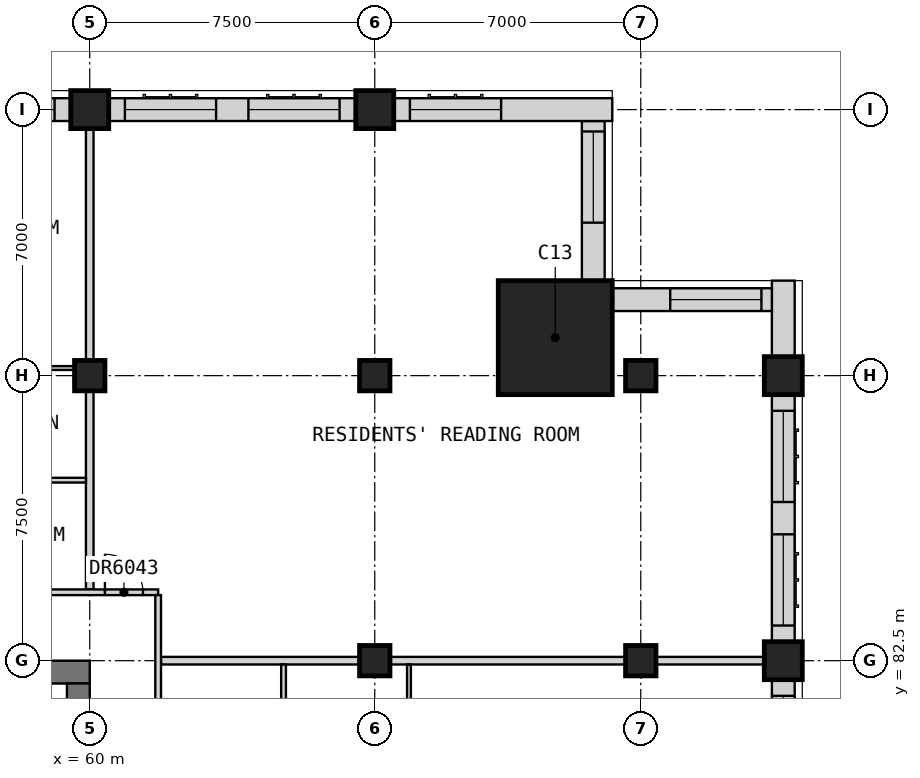
"""IFC4 building model, lengths in metres.
Left out: names, types, materials, properties, quantities, classifications, styles, units other than length and angle.
Written with IfcOpenShell. Run it as: python <this file> out.ifc"""

import sys

from ifc_helpers import new_model, si_unit, direction, frame, frame_2d, origin, origin_2d, place, context, subcontext, project, spatial, rectangle, extrude, element, fill, save


model = new_model("IFC4")
c1 = context("Model", 3, precision=1e-05, world=origin(), true_north=direction((0.0, 1.0)))
c2 = subcontext(c1, "Body", "Model", "MODEL_VIEW")
j1 = project(units=[si_unit("LENGTHUNIT", "METRE"), si_unit("PLANEANGLEUNIT", "RADIAN")], contexts=[c1])
p1 = place(None, origin())
s1 = spatial("IfcSite", under=j1, at=p1, CompositionType="ELEMENT")
p2 = place(p1, origin())
s2 = spatial("IfcBuilding", under=s1, at=p2, CompositionType="ELEMENT")
p3 = place(p2, frame((0.0, 0.0, 226.7)))
s3 = spatial("IfcBuildingStorey", under=s2, at=p3, CompositionType="ELEMENT", Elevation=226.7)
for number, where, z_axis, x_axis in (
    (1, (78.25, 82.5, 0.0), (0.0, 0.0, 1.0), (1.0, 0.0, 0.0)),
    (2, (78.25, 90.0, 0.0), (0.0, 0.0, 1.0), (1.0, 0.0, 0.0)),
):
    element("IfcColumn", number, at=place(p3, frame(where, z_axis=z_axis, x_axis=x_axis)), inside=s3, PredefinedType="COLUMN", context=c2, shape_type="SweptSolid", body=[
        extrude(rectangle(XDim=1.0, YDim=1.0, at=origin_2d()), origin(), (0.0, 0.0, 1.0), 3.5),
    ])
p4 = place(p3, frame((60.0, 90.0, 0.0), z_axis=(0.0, 0.0, 1.0), x_axis=(1.0, 0.0, 0.0)))
e3 = element("IfcColumn", 3, at=p4, inside=s3, PredefinedType="COLUMN", context=c2, shape_type="SweptSolid", body=[
    extrude(rectangle(XDim=0.8, YDim=0.8, at=origin_2d()), origin(), (0.0, 0.0, 1.0), 3.5),
])
p5 = place(p3, frame((60.0, 97.0, 0.0), z_axis=(0.0, 0.0, 1.0), x_axis=(1.0, 0.0, 0.0)))
e4 = element("IfcColumn", 4, at=p5, inside=s3, PredefinedType="COLUMN", context=c2, shape_type="SweptSolid", body=[
    extrude(rectangle(XDim=1.0, YDim=1.0, at=origin_2d()), origin(), (0.0, 0.0, 1.0), 3.5),
])
for number, where, z_axis, x_axis in (
    (5, (67.5, 82.5, 0.0), (0.0, 0.0, 1.0), (1.0, 0.0, 0.0)),
    (6, (67.5, 90.0, 0.0), (0.0, 0.0, 1.0), (1.0, 0.0, 0.0)),
):
    element("IfcColumn", number, at=place(p3, frame(where, z_axis=z_axis, x_axis=x_axis)), inside=s3, PredefinedType="COLUMN", context=c2, shape_type="SweptSolid", body=[
        extrude(rectangle(XDim=0.8, YDim=0.8, at=origin_2d()), origin(), (0.0, 0.0, 1.0), 3.5),
    ])
p6 = place(p3, frame((67.5, 97.0, 0.0), z_axis=(0.0, 0.0, 1.0), x_axis=(1.0, 0.0, 0.0)))
e7 = element("IfcColumn", 7, at=p6, inside=s3, PredefinedType="COLUMN", context=c2, shape_type="SweptSolid", body=[
    extrude(rectangle(XDim=1.0, YDim=1.0, at=origin_2d()), origin(), (0.0, 0.0, 1.0), 3.5),
])
for number, where, z_axis, x_axis in (
    (8, (74.5, 82.5, 0.0), (0.0, 0.0, 1.0), (1.0, 0.0, 0.0)),
    (9, (74.5, 90.0, 0.0), (0.0, 0.0, 1.0), (1.0, 0.0, 0.0)),
):
    element("IfcColumn", number, at=place(p3, frame(where, z_axis=z_axis, x_axis=x_axis)), inside=s3, PredefinedType="COLUMN", context=c2, shape_type="SweptSolid", body=[
        extrude(rectangle(XDim=0.8, YDim=0.8, at=origin_2d()), origin(), (0.0, 0.0, 1.0), 3.5),
    ])
p7 = place(p3, frame((72.25, 91.0, 0.0), z_axis=(0.0, 0.0, 1.0), x_axis=(1.0, 0.0, 0.0)))
e10 = element("IfcColumn", 10, at=p7, inside=s3, PredefinedType="COLUMN", context=c2, shape_type="SweptSolid", body=[
    extrude(rectangle(XDim=3.0, YDim=3.0, at=origin_2d()), origin(), (0.0, 0.0, 1.0), 3.5),
])
p8 = place(p3, frame((30.0, 82.2, 0.0), z_axis=(0.0, 0.0, 1.0), x_axis=(1.0, 0.0, 0.0)))
e11 = element("IfcWall", 11, at=p8, inside=s3, PredefinedType="SHEAR", context=c2, shape_type="SweptSolid", body=[
    extrude(rectangle(XDim=30.0, YDim=0.6, at=frame_2d((15.0, 0.0))), origin(), (0.0, 0.0, 1.0), 3.5),
])
p9 = place(p3, frame((59.7, 60.6, 0.0), z_axis=(0.0, 0.0, 1.0), x_axis=(0.0, 1.0, 0.0)))
e12 = element("IfcWall", 12, at=p9, inside=s3, PredefinedType="SHEAR", context=c2, shape_type="SweptSolid", body=[
    extrude(rectangle(XDim=21.3, YDim=0.6, at=frame_2d((10.65, 0.0))), origin(), (0.0, 0.0, 1.0), 3.5),
])
p10 = place(p9, frame((14.9, 0.0, 0.0)))
e13 = element("IfcOpeningElement", 13, at=p10, cuts=e12, PredefinedType="OPENING", context=c2, shape_type="SweptSolid", body=[
    extrude(rectangle(XDim=1.8, YDim=2.1, at=frame_2d((0.9, 1.05))), frame((0.0, 0.31, 0.0), z_axis=(0.0, -1.0, 0.0), x_axis=(1.0, 0.0, 0.0)), (0.0, 0.0, 1.0), 0.62),
])
p11 = place(p3, frame((78.25, 75.5, 0.0), z_axis=(0.0, 0.0, 1.0), x_axis=(0.0, 1.0, 0.0)))
e14 = element("IfcWall", 14, at=p11, inside=s3, PredefinedType="SOLIDWALL", context=c2, shape_type="SweptSolid", body=[
    extrude(rectangle(XDim=6.5, YDim=0.6, at=frame_2d((3.25, 0.0))), origin(), (0.0, 0.0, 1.0), 2.75),
])
p12 = place(p11, frame((0.425, 0.0, 0.8)))
e15 = element("IfcOpeningElement", 15, at=p12, cuts=e14, PredefinedType="OPENING", context=c2, shape_type="SweptSolid", body=[
    extrude(rectangle(XDim=2.4, YDim=1.8, at=frame_2d((1.2, 0.9))), frame((0.0, 0.31, 0.0), z_axis=(0.0, -1.0, 0.0), x_axis=(1.0, 0.0, 0.0)), (0.0, 0.0, 1.0), 0.62),
])
p13 = place(p11, frame((3.675, 0.0, 0.8)))
e16 = element("IfcOpeningElement", 16, at=p13, cuts=e14, PredefinedType="OPENING", context=c2, shape_type="SweptSolid", body=[
    extrude(rectangle(XDim=2.4, YDim=1.8, at=frame_2d((1.2, 0.9))), frame((0.0, 0.31, 0.0), z_axis=(0.0, -1.0, 0.0), x_axis=(1.0, 0.0, 0.0)), (0.0, 0.0, 1.0), 0.62),
])
p14 = place(p3, frame((78.25, 83.0, 0.0), z_axis=(0.0, 0.0, 1.0), x_axis=(0.0, 1.0, 0.0)))
e17 = element("IfcWall", 17, at=p14, inside=s3, PredefinedType="SOLIDWALL", context=c2, shape_type="SweptSolid", body=[
    extrude(rectangle(XDim=6.5, YDim=0.6, at=frame_2d((3.25, 0.0))), origin(), (0.0, 0.0, 1.0), 2.75),
])
p15 = place(p14, frame((0.425, 0.0, 0.8)))
e18 = element("IfcOpeningElement", 18, at=p15, cuts=e17, PredefinedType="OPENING", context=c2, shape_type="SweptSolid", body=[
    extrude(rectangle(XDim=2.4, YDim=1.8, at=frame_2d((1.2, 0.9))), frame((0.0, 0.31, 0.0), z_axis=(0.0, -1.0, 0.0), x_axis=(1.0, 0.0, 0.0)), (0.0, 0.0, 1.0), 0.62),
])
p16 = place(p14, frame((3.675, 0.0, 0.8)))
e19 = element("IfcOpeningElement", 19, at=p16, cuts=e17, PredefinedType="OPENING", context=c2, shape_type="SweptSolid", body=[
    extrude(rectangle(XDim=2.4, YDim=1.8, at=frame_2d((1.2, 0.9))), frame((0.0, 0.31, 0.0), z_axis=(0.0, -1.0, 0.0), x_axis=(1.0, 0.0, 0.0)), (0.0, 0.0, 1.0), 0.62),
])
p17 = place(p3, frame((78.25, 90.5, 0.0), z_axis=(0.0, 0.0, 1.0), x_axis=(0.0, 1.0, 0.0)))
e20 = element("IfcWall", 20, at=p17, inside=s3, PredefinedType="SOLIDWALL", context=c2, shape_type="SweptSolid", body=[
    extrude(rectangle(XDim=2.0, YDim=0.6, at=frame_2d((1.0, 0.0))), origin(), (0.0, 0.0, 1.0), 3.25),
])
p18 = place(p3, frame((77.95, 92.0, 0.0), z_axis=(0.0, 0.0, 1.0), x_axis=(-1.0, 0.0, 0.0)))
e21 = element("IfcWall", 21, at=p18, inside=s3, PredefinedType="SOLIDWALL", context=c2, shape_type="SweptSolid", body=[
    extrude(rectangle(XDim=4.2, YDim=0.6, at=frame_2d((2.1, 0.0))), origin(), (0.0, 0.0, 1.0), 3.25),
])
p19 = place(p18, frame((0.275, 0.0, 0.8)))
e22 = element("IfcOpeningElement", 22, at=p19, cuts=e21, PredefinedType="OPENING", context=c2, shape_type="SweptSolid", body=[
    extrude(rectangle(XDim=2.4, YDim=1.8, at=frame_2d((1.2, 0.9))), frame((0.0, 0.31, 0.0), z_axis=(0.0, -1.0, 0.0), x_axis=(1.0, 0.0, 0.0)), (0.0, 0.0, 1.0), 0.62),
])
p20 = place(p3, frame((73.25, 92.5, 0.0), z_axis=(0.0, 0.0, 1.0), x_axis=(0.0, 1.0, 0.0)))
e23 = element("IfcWall", 23, at=p20, inside=s3, PredefinedType="SOLIDWALL", context=c2, shape_type="SweptSolid", body=[
    extrude(rectangle(XDim=4.2, YDim=0.6, at=frame_2d((2.1, 0.0))), origin(), (0.0, 0.0, 1.0), 3.25),
])
p21 = place(p20, frame((1.525, 0.0, 0.8)))
e24 = element("IfcOpeningElement", 24, at=p21, cuts=e23, PredefinedType="OPENING", context=c2, shape_type="SweptSolid", body=[
    extrude(rectangle(XDim=2.4, YDim=1.8, at=frame_2d((1.2, 0.9))), frame((0.0, 0.31, 0.0), z_axis=(0.0, -1.0, 0.0), x_axis=(1.0, 0.0, 0.0)), (0.0, 0.0, 1.0), 0.62),
])
p22 = place(p3, frame((73.75, 97.0, 0.0), z_axis=(0.0, 0.0, 1.0), x_axis=(-1.0, 0.0, 0.0)))
e25 = element("IfcWall", 25, at=p22, inside=s3, PredefinedType="SOLIDWALL", context=c2, shape_type="SweptSolid", body=[
    extrude(rectangle(XDim=5.75, YDim=0.6, at=frame_2d((2.875, 0.0))), origin(), (0.0, 0.0, 1.0), 2.75),
])
p23 = place(p22, frame((2.925, 0.0, 0.8)))
e26 = element("IfcOpeningElement", 26, at=p23, cuts=e25, PredefinedType="OPENING", context=c2, shape_type="SweptSolid", body=[
    extrude(rectangle(XDim=2.4, YDim=1.8, at=frame_2d((1.2, 0.9))), frame((0.0, 0.31, 0.0), z_axis=(0.0, -1.0, 0.0), x_axis=(1.0, 0.0, 0.0)), (0.0, 0.0, 1.0), 0.62),
])
p24 = place(p3, frame((67.0, 97.0, 0.0), z_axis=(0.0, 0.0, 1.0), x_axis=(-1.0, 0.0, 0.0)))
e27 = element("IfcWall", 27, at=p24, inside=s3, PredefinedType="SOLIDWALL", context=c2, shape_type="SweptSolid", body=[
    extrude(rectangle(XDim=6.5, YDim=0.6, at=frame_2d((3.25, 0.0))), origin(), (0.0, 0.0, 1.0), 2.75),
])
p25 = place(p24, frame((3.675, 0.0, 0.8)))
e28 = element("IfcOpeningElement", 28, at=p25, cuts=e27, PredefinedType="OPENING", context=c2, shape_type="SweptSolid", body=[
    extrude(rectangle(XDim=2.4, YDim=1.8, at=frame_2d((1.2, 0.9))), frame((0.0, 0.31, 0.0), z_axis=(0.0, -1.0, 0.0), x_axis=(1.0, 0.0, 0.0)), (0.0, 0.0, 1.0), 0.62),
])
p26 = place(p24, frame((0.425, 0.0, 0.8)))
e29 = element("IfcOpeningElement", 29, at=p26, cuts=e27, PredefinedType="OPENING", context=c2, shape_type="SweptSolid", body=[
    extrude(rectangle(XDim=2.4, YDim=1.8, at=frame_2d((1.2, 0.9))), frame((0.0, 0.31, 0.0), z_axis=(0.0, -1.0, 0.0), x_axis=(1.0, 0.0, 0.0)), (0.0, 0.0, 1.0), 0.62),
])
p27 = place(p3, frame((59.5, 97.0, 0.0), z_axis=(0.0, 0.0, 1.0), x_axis=(-1.0, 0.0, 0.0)))
e30 = element("IfcWall", 30, at=p27, inside=s3, PredefinedType="SOLIDWALL", context=c2, shape_type="SweptSolid", body=[
    extrude(rectangle(XDim=6.5, YDim=0.6, at=frame_2d((3.25, 0.0))), origin(), (0.0, 0.0, 1.0), 2.75),
])
p28 = place(p27, frame((3.675, 0.0, 0.8)))
e31 = element("IfcOpeningElement", 31, at=p28, cuts=e30, PredefinedType="OPENING", context=c2, shape_type="SweptSolid", body=[
    extrude(rectangle(XDim=2.4, YDim=1.8, at=frame_2d((1.2, 0.9))), frame((0.0, 0.31, 0.0), z_axis=(0.0, -1.0, 0.0), x_axis=(1.0, 0.0, 0.0)), (0.0, 0.0, 1.0), 0.62),
])
p29 = place(p27, frame((0.425, 0.0, 0.8)))
e32 = element("IfcOpeningElement", 32, at=p29, cuts=e30, PredefinedType="OPENING", context=c2, shape_type="SweptSolid", body=[
    extrude(rectangle(XDim=2.4, YDim=1.8, at=frame_2d((1.2, 0.9))), frame((0.0, 0.31, 0.0), z_axis=(0.0, -1.0, 0.0), x_axis=(1.0, 0.0, 0.0)), (0.0, 0.0, 1.0), 0.62),
])
p30 = place(p3, frame((61.875, 82.5, 0.0), z_axis=(0.0, 0.0, 1.0), x_axis=(1.0, 0.0, 0.0)))
e33 = element("IfcWall", 33, at=p30, inside=s3, PredefinedType="PARTITIONING", context=c2, shape_type="SweptSolid", body=[
    extrude(rectangle(XDim=16.875, YDim=0.2, at=frame_2d((8.438, 0.0))), origin(), (0.0, 0.0, 1.0), 3.25),
])
p31 = place(p3, frame((60.0, 84.375, 0.0), z_axis=(0.0, 0.0, 1.0), x_axis=(0.0, 1.0, 0.0)))
e34 = element("IfcWall", 34, at=p31, inside=s3, PredefinedType="PARTITIONING", context=c2, shape_type="SweptSolid", body=[
    extrude(rectangle(XDim=13.125, YDim=0.2, at=frame_2d((6.562, 0.0))), origin(), (0.0, 0.0, 1.0), 3.25),
])
p32 = place(p3, frame((33.75, 84.3, 0.0), z_axis=(0.0, 0.0, 1.0), x_axis=(1.0, 0.0, 0.0)))
e35 = element("IfcWall", 35, at=p32, inside=s3, PredefinedType="PARTITIONING", context=c2, shape_type="SweptSolid", body=[
    extrude(rectangle(XDim=28.05, YDim=0.15, at=frame_2d((14.025, 0.0))), origin(), (0.0, 0.0, 1.0), 3.25),
])
p33 = place(p32, frame((12.675, 0.0, 0.0)))
e36 = element("IfcOpeningElement", 36, at=p33, cuts=e35, PredefinedType="OPENING", context=c2, shape_type="SweptSolid", body=[
    extrude(rectangle(XDim=0.9, YDim=2.1, at=frame_2d((0.45, 1.05))), frame((0.0, 0.085, 0.0), z_axis=(0.0, -1.0, 0.0), x_axis=(1.0, 0.0, 0.0)), (0.0, 0.0, 1.0), 0.17),
])
p34 = place(p32, frame((20.175, 0.0, 0.0)))
e37 = element("IfcOpeningElement", 37, at=p34, cuts=e35, PredefinedType="OPENING", context=c2, shape_type="SweptSolid", body=[
    extrude(rectangle(XDim=0.9, YDim=2.1, at=frame_2d((0.45, 1.05))), frame((0.0, 0.085, 0.0), z_axis=(0.0, -1.0, 0.0), x_axis=(1.0, 0.0, 0.0)), (0.0, 0.0, 1.0), 0.17),
])
p35 = place(p32, frame((26.65, 0.0, 0.0)))
e38 = element("IfcOpeningElement", 38, at=p35, cuts=e35, PredefinedType="OPENING", context=c2, shape_type="SweptSolid", body=[
    extrude(rectangle(XDim=1.0, YDim=2.1, at=frame_2d((0.5, 1.05))), frame((0.0, 0.085, 0.0), z_axis=(0.0, -1.0, 0.0), x_axis=(1.0, 0.0, 0.0)), (0.0, 0.0, 1.0), 0.17),
])
p36 = place(p3, frame((61.8, 58.275, 0.0), z_axis=(0.0, 0.0, 1.0), x_axis=(0.0, 1.0, 0.0)))
e39 = element("IfcWall", 39, at=p36, inside=s3, PredefinedType="PARTITIONING", context=c2, shape_type="SweptSolid", body=[
    extrude(rectangle(XDim=25.95, YDim=0.15, at=frame_2d((12.975, 0.0))), origin(), (0.0, 0.0, 1.0), 3.25),
])
p37 = place(p36, frame((4.575, 0.0, 0.0)))
e40 = element("IfcOpeningElement", 40, at=p37, cuts=e39, PredefinedType="OPENING", context=c2, shape_type="SweptSolid", body=[
    extrude(rectangle(XDim=1.8, YDim=2.1, at=frame_2d((0.9, 1.05))), frame((0.0, 0.085, 0.0), z_axis=(0.0, -1.0, 0.0), x_axis=(1.0, 0.0, 0.0)), (0.0, 0.0, 1.0), 0.17),
])
p38 = place(p36, frame((10.65, 0.0, 0.0)))
e41 = element("IfcOpeningElement", 41, at=p38, cuts=e39, PredefinedType="OPENING", context=c2, shape_type="SweptSolid", body=[
    extrude(rectangle(XDim=0.9, YDim=2.1, at=frame_2d((0.45, 1.05))), frame((0.0, 0.085, 0.0), z_axis=(0.0, -1.0, 0.0), x_axis=(1.0, 0.0, 0.0)), (0.0, 0.0, 1.0), 0.17),
])
p39 = place(p36, frame((18.15, 0.0, 0.0)))
e42 = element("IfcOpeningElement", 42, at=p39, cuts=e39, PredefinedType="OPENING", context=c2, shape_type="SweptSolid", body=[
    extrude(rectangle(XDim=0.9, YDim=2.1, at=frame_2d((0.45, 1.05))), frame((0.0, 0.085, 0.0), z_axis=(0.0, -1.0, 0.0), x_axis=(1.0, 0.0, 0.0)), (0.0, 0.0, 1.0), 0.17),
])
p40 = place(p3, frame((30.0, 90.2, 0.0), z_axis=(0.0, 0.0, 1.0), x_axis=(1.0, 0.0, 0.0)))
e43 = element("IfcWall", 43, at=p40, inside=s3, PredefinedType="PARTITIONING", context=c2, shape_type="SweptSolid", body=[
    extrude(rectangle(XDim=29.9, YDim=0.1, at=frame_2d((14.95, 0.0))), origin(), (0.0, 0.0, 1.0), 2.75),
])
p41 = place(p40, frame((1.425, 0.0, 0.0)))
e44 = element("IfcOpeningElement", 44, at=p41, cuts=e43, PredefinedType="OPENING", context=c2, shape_type="SweptSolid", body=[
    extrude(rectangle(XDim=0.9, YDim=2.1, at=frame_2d((0.45, 1.05))), frame((0.0, 0.06, 0.0), z_axis=(0.0, -1.0, 0.0), x_axis=(1.0, 0.0, 0.0)), (0.0, 0.0, 1.0), 0.12),
])
p42 = place(p40, frame((8.925, 0.0, 0.0)))
e45 = element("IfcOpeningElement", 45, at=p42, cuts=e43, PredefinedType="OPENING", context=c2, shape_type="SweptSolid", body=[
    extrude(rectangle(XDim=0.9, YDim=2.1, at=frame_2d((0.45, 1.05))), frame((0.0, 0.06, 0.0), z_axis=(0.0, -1.0, 0.0), x_axis=(1.0, 0.0, 0.0)), (0.0, 0.0, 1.0), 0.12),
])
p43 = place(p40, frame((12.675, 0.0, 0.0)))
e46 = element("IfcOpeningElement", 46, at=p43, cuts=e43, PredefinedType="OPENING", context=c2, shape_type="SweptSolid", body=[
    extrude(rectangle(XDim=0.9, YDim=2.1, at=frame_2d((0.45, 1.05))), frame((0.0, 0.06, 0.0), z_axis=(0.0, -1.0, 0.0), x_axis=(1.0, 0.0, 0.0)), (0.0, 0.0, 1.0), 0.12),
])
p44 = place(p40, frame((16.425, 0.0, 0.0)))
e47 = element("IfcOpeningElement", 47, at=p44, cuts=e43, PredefinedType="OPENING", context=c2, shape_type="SweptSolid", body=[
    extrude(rectangle(XDim=0.9, YDim=2.1, at=frame_2d((0.45, 1.05))), frame((0.0, 0.06, 0.0), z_axis=(0.0, -1.0, 0.0), x_axis=(1.0, 0.0, 0.0)), (0.0, 0.0, 1.0), 0.12),
])
p45 = place(p40, frame((23.925, 0.0, 0.0)))
e48 = element("IfcOpeningElement", 48, at=p45, cuts=e43, PredefinedType="OPENING", context=c2, shape_type="SweptSolid", body=[
    extrude(rectangle(XDim=0.9, YDim=2.1, at=frame_2d((0.45, 1.05))), frame((0.0, 0.06, 0.0), z_axis=(0.0, -1.0, 0.0), x_axis=(1.0, 0.0, 0.0)), (0.0, 0.0, 1.0), 0.12),
])
p46 = place(p3, frame((68.4, 67.6, 0.0), z_axis=(0.0, 0.0, 1.0), x_axis=(0.0, 1.0, 0.0)))
e49 = element("IfcWall", 49, at=p46, inside=s3, PredefinedType="PARTITIONING", context=c2, shape_type="SweptSolid", body=[
    extrude(rectangle(XDim=14.8, YDim=0.1, at=frame_2d((7.4, 0.0))), origin(), (0.0, 0.0, 1.0), 3.25),
])
p47 = place(p46, frame((1.325, 0.0, 0.0)))
e50 = element("IfcOpeningElement", 50, at=p47, cuts=e49, PredefinedType="OPENING", context=c2, shape_type="SweptSolid", body=[
    extrude(rectangle(XDim=0.9, YDim=2.1, at=frame_2d((0.45, 1.05))), frame((0.0, 0.06, 0.0), z_axis=(0.0, -1.0, 0.0), x_axis=(1.0, 0.0, 0.0)), (0.0, 0.0, 1.0), 0.12),
])
p48 = place(p46, frame((8.825, 0.0, 0.0)))
e51 = element("IfcOpeningElement", 51, at=p48, cuts=e49, PredefinedType="OPENING", context=c2, shape_type="SweptSolid", body=[
    extrude(rectangle(XDim=0.9, YDim=2.1, at=frame_2d((0.45, 1.05))), frame((0.0, 0.06, 0.0), z_axis=(0.0, -1.0, 0.0), x_axis=(1.0, 0.0, 0.0)), (0.0, 0.0, 1.0), 0.12),
])
p49 = place(p3, frame((56.25, 87.25, 0.0), z_axis=(0.0, 0.0, 1.0), x_axis=(1.0, 0.0, 0.0)))
e52 = element("IfcWall", 52, at=p49, inside=s3, PredefinedType="PARTITIONING", context=c2, shape_type="SweptSolid", body=[
    extrude(rectangle(XDim=3.65, YDim=0.125, at=frame_2d((1.825, 0.0))), origin(), (0.0, 0.0, 1.0), 3.25),
])
p50 = place(p3, frame((65.1, 78.812, 0.0), z_axis=(0.0, 0.0, 1.0), x_axis=(0.0, 1.0, 0.0)))
e53 = element("IfcWall", 53, at=p50, inside=s3, PredefinedType="PARTITIONING", context=c2, shape_type="SweptSolid", body=[
    extrude(rectangle(XDim=3.587, YDim=0.125, at=frame_2d((1.794, 0.0))), origin(), (0.0, 0.0, 1.0), 3.25),
])
p51 = place(p13, origin())
e54 = element("IfcWindow", 54, at=p51, inside=s3, PartitioningType="SINGLE_PANEL", PredefinedType="WINDOW", context=c2, shape_type="SweptSolid", body=[
    extrude(rectangle(XDim=2.4, YDim=1.8, at=frame_2d((1.2, 0.9))), frame((0.0, -0.07, 0.0), z_axis=(0.0, -1.0, 0.0), x_axis=(1.0, 0.0, 0.0)), (0.0, 0.0, 1.0), 0.06),
])
fill(e16, e54)
p52 = place(p15, origin())
e55 = element("IfcWindow", 55, at=p52, inside=s3, PartitioningType="SINGLE_PANEL", PredefinedType="WINDOW", context=c2, shape_type="SweptSolid", body=[
    extrude(rectangle(XDim=2.4, YDim=1.8, at=frame_2d((1.2, 0.9))), frame((0.0, -0.07, 0.0), z_axis=(0.0, -1.0, 0.0), x_axis=(1.0, 0.0, 0.0)), (0.0, 0.0, 1.0), 0.06),
])
fill(e18, e55)
p53 = place(p16, origin())
e56 = element("IfcWindow", 56, at=p53, inside=s3, PartitioningType="SINGLE_PANEL", PredefinedType="WINDOW", context=c2, shape_type="SweptSolid", body=[
    extrude(rectangle(XDim=2.4, YDim=1.8, at=frame_2d((1.2, 0.9))), frame((0.0, -0.07, 0.0), z_axis=(0.0, -1.0, 0.0), x_axis=(1.0, 0.0, 0.0)), (0.0, 0.0, 1.0), 0.06),
])
fill(e19, e56)
p54 = place(p19, origin())
e57 = element("IfcWindow", 57, at=p54, inside=s3, PartitioningType="SINGLE_PANEL", PredefinedType="WINDOW", context=c2, shape_type="SweptSolid", body=[
    extrude(rectangle(XDim=2.4, YDim=1.8, at=frame_2d((1.2, 0.9))), frame((0.0, -0.07, 0.0), z_axis=(0.0, -1.0, 0.0), x_axis=(1.0, 0.0, 0.0)), (0.0, 0.0, 1.0), 0.06),
])
fill(e22, e57)
p55 = place(p21, origin())
e58 = element("IfcWindow", 58, at=p55, inside=s3, PartitioningType="SINGLE_PANEL", PredefinedType="WINDOW", context=c2, shape_type="SweptSolid", body=[
    extrude(rectangle(XDim=2.4, YDim=1.8, at=frame_2d((1.2, 0.9))), frame((0.0, -0.07, 0.0), z_axis=(0.0, -1.0, 0.0), x_axis=(1.0, 0.0, 0.0)), (0.0, 0.0, 1.0), 0.06),
])
fill(e24, e58)
p56 = place(p23, origin())
e59 = element("IfcWindow", 59, at=p56, inside=s3, PartitioningType="SINGLE_PANEL", PredefinedType="WINDOW", context=c2, shape_type="SweptSolid", body=[
    extrude(rectangle(XDim=2.4, YDim=1.8, at=frame_2d((1.2, 0.9))), frame((0.0, -0.07, 0.0), z_axis=(0.0, -1.0, 0.0), x_axis=(1.0, 0.0, 0.0)), (0.0, 0.0, 1.0), 0.06),
])
fill(e26, e59)
p57 = place(p25, origin())
e60 = element("IfcWindow", 60, at=p57, inside=s3, PartitioningType="SINGLE_PANEL", PredefinedType="WINDOW", context=c2, shape_type="SweptSolid", body=[
    extrude(rectangle(XDim=2.4, YDim=1.8, at=frame_2d((1.2, 0.9))), frame((0.0, -0.07, 0.0), z_axis=(0.0, -1.0, 0.0), x_axis=(1.0, 0.0, 0.0)), (0.0, 0.0, 1.0), 0.06),
])
fill(e28, e60)
p58 = place(p26, origin())
e61 = element("IfcWindow", 61, at=p58, inside=s3, PartitioningType="SINGLE_PANEL", PredefinedType="WINDOW", context=c2, shape_type="SweptSolid", body=[
    extrude(rectangle(XDim=2.4, YDim=1.8, at=frame_2d((1.2, 0.9))), frame((0.0, -0.07, 0.0), z_axis=(0.0, -1.0, 0.0), x_axis=(1.0, 0.0, 0.0)), (0.0, 0.0, 1.0), 0.06),
])
fill(e29, e61)
p59 = place(p29, origin())
e62 = element("IfcWindow", 62, at=p59, inside=s3, PartitioningType="SINGLE_PANEL", PredefinedType="WINDOW", context=c2, shape_type="SweptSolid", body=[
    extrude(rectangle(XDim=2.4, YDim=1.8, at=frame_2d((1.2, 0.9))), frame((0.0, -0.07, 0.0), z_axis=(0.0, -1.0, 0.0), x_axis=(1.0, 0.0, 0.0)), (0.0, 0.0, 1.0), 0.06),
])
fill(e32, e62)
p60 = place(p35, origin())
e63 = element("IfcDoor", 63, at=p60, inside=s3, OperationType="SINGLE_SWING_LEFT", PredefinedType="DOOR", context=c2, shape_type="SweptSolid", body=[
    extrude(rectangle(XDim=1.0, YDim=2.1, at=frame_2d((0.5, 1.05))), frame((0.0, 0.025, 0.0), z_axis=(0.0, -1.0, 0.0), x_axis=(1.0, 0.0, 0.0)), (0.0, 0.0, 1.0), 0.05),
])
fill(e38, e63)
save(model, sys.argv[1])
